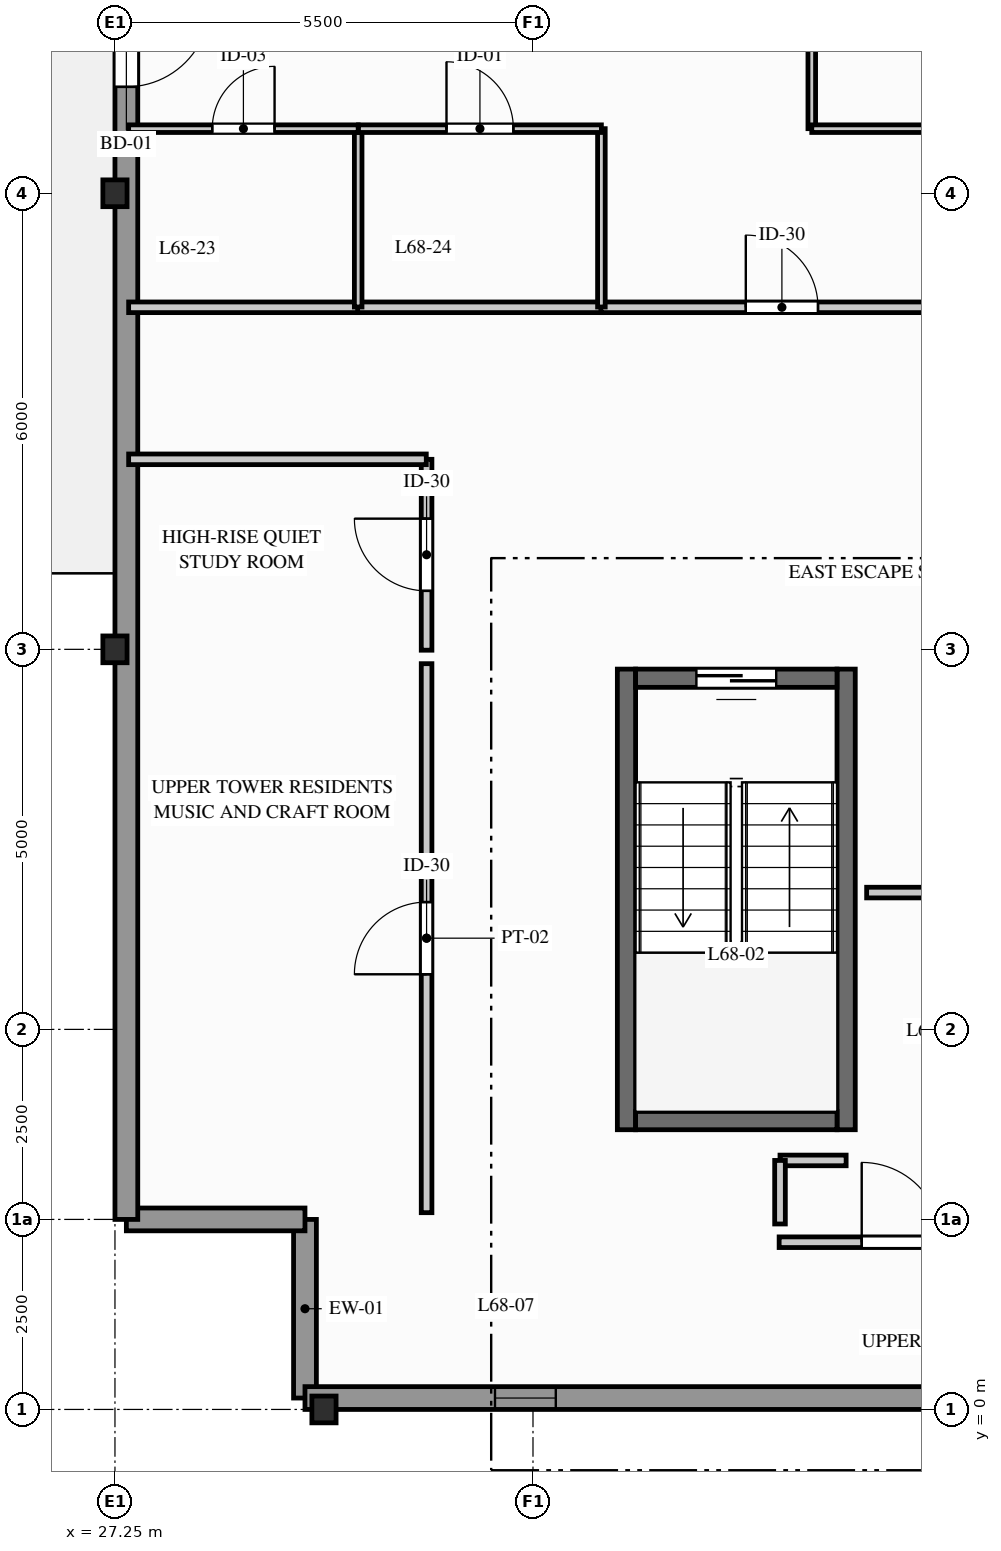
"""IFC4 building model, lengths in metres.
Left out: names, types, materials, properties, quantities, classifications, styles, units other than length and angle.
Written with IfcOpenShell. Run it as: python <this file> out.ifc"""

import sys

from ifc_helpers import new_model, si_unit, direction, frame, frame_2d, origin, origin_2d, place, context, subcontext, project, spatial, rectangle, i_section, extrude, element, fill, save


model = new_model("IFC4")
c1 = context("Model", 3, precision=1e-05, world=origin(), true_north=direction((0.0, 1.0)))
c2 = subcontext(c1, "Body", "Model", "MODEL_VIEW")
j1 = project(units=[si_unit("LENGTHUNIT", "METRE"), si_unit("PLANEANGLEUNIT", "RADIAN")], contexts=[c1])
p1 = place(None, origin())
s1 = spatial("IfcSite", under=j1, at=p1, CompositionType="ELEMENT")
p2 = place(p1, origin())
s2 = spatial("IfcBuilding", under=s1, at=p2, CompositionType="ELEMENT")
p3 = place(p2, frame((0.0, 0.0, 224.2)))
s3 = spatial("IfcBuildingStorey", under=s2, at=p3, CompositionType="ELEMENT", Elevation=224.2)
for number, where, z_axis, x_axis in (
    (1, (27.25, 10.0, 0.0), (0.0, 0.0, 1.0), (1.0, 0.0, 0.0)),
    (2, (27.25, 16.0, 0.0), (0.0, 0.0, 1.0), (1.0, 0.0, 0.0)),
    (3, (30.0, 0.0, 0.0), (0.0, 0.0, 1.0), (1.0, 0.0, 0.0)),
):
    element("IfcColumn", number, at=place(p3, frame(where, z_axis=z_axis, x_axis=x_axis)), inside=s3, PredefinedType="COLUMN", context=c2, shape_type="SweptSolid", body=[
        extrude(i_section(OverallWidth=0.318, OverallDepth=0.353, WebThickness=0.023, FlangeThickness=0.038, FilletRadius=0.015, at=origin_2d()), origin(), (0.0, 0.0, 1.0), 3.1),
    ])
for number, where, z_axis, x_axis in (
    (4, (29.75, 2.5, 0.0), (0.0, 0.0, 1.0), (0.0, -1.0, 0.0)),
    (5, (27.4, 2.5, 0.0), (0.0, 0.0, 1.0), (1.0, 0.0, 0.0)),
):
    element("IfcWall", number, at=place(p3, frame(where, z_axis=z_axis, x_axis=x_axis)), inside=s3, PredefinedType="STANDARD", context=c2, shape_type="SweptSolid", body=[
        extrude(rectangle(XDim=2.35, YDim=0.3, at=frame_2d((1.175, 0.0))), origin(), (0.0, 0.0, 1.0), 2.89),
    ])
p4 = place(p3, frame((29.75, 0.15, 0.0), z_axis=(0.0, 0.0, 1.0), x_axis=(1.0, 0.0, 0.0)))
e6 = element("IfcWall", 6, at=p4, inside=s3, PredefinedType="STANDARD", context=c2, shape_type="SweptSolid", body=[
    extrude(rectangle(XDim=27.75, YDim=0.3, at=frame_2d((13.875, 0.0))), origin(), (0.0, 0.0, 1.0), 2.332),
])
p5 = place(p4, frame((2.5, 0.0, 0.712)))
e7 = element("IfcOpeningElement", 7, at=p5, cuts=e6, PredefinedType="OPENING", context=c2, shape_type="SweptSolid", body=[
    extrude(rectangle(XDim=0.8, YDim=1.4, at=frame_2d((0.4, 0.7))), frame((0.0, 0.16, 0.0), z_axis=(0.0, -1.0, 0.0), x_axis=(1.0, 0.0, 0.0)), (0.0, 0.0, 1.0), 0.32),
])
p6 = place(p4, frame((21.25, 0.0, 0.312)))
e8 = element("IfcOpeningElement", 8, at=p6, cuts=e6, PredefinedType="OPENING", context=c2, shape_type="SweptSolid", body=[
    extrude(rectangle(XDim=1.5, YDim=1.8, at=frame_2d((0.75, 0.9))), frame((0.0, 0.16, 0.0), z_axis=(0.0, -1.0, 0.0), x_axis=(1.0, 0.0, 0.0)), (0.0, 0.0, 1.0), 0.32),
])
p7 = place(p3, frame((27.4, 24.0, 0.0), z_axis=(0.0, 0.0, 1.0), x_axis=(0.0, -1.0, 0.0)))
e9 = element("IfcWall", 9, at=p7, inside=s3, PredefinedType="STANDARD", context=c2, shape_type="SweptSolid", body=[
    extrude(rectangle(XDim=21.5, YDim=0.3, at=frame_2d((10.75, 0.0))), origin(), (0.0, 0.0, 1.0), 2.332),
])
p8 = place(p7, frame((5.5, 0.0, 0.0)))
e10 = element("IfcOpeningElement", 10, at=p8, cuts=e9, PredefinedType="OPENING", context=c2, shape_type="SweptSolid", body=[
    extrude(rectangle(XDim=1.1, YDim=2.2, at=frame_2d((0.55, 1.1))), frame((0.0, 0.16, 0.0), z_axis=(0.0, -1.0, 0.0), x_axis=(1.0, 0.0, 0.0)), (0.0, 0.0, 1.0), 0.32),
])
p9 = place(p7, frame((2.43, 0.0, 0.312)))
e11 = element("IfcOpeningElement", 11, at=p9, cuts=e9, PredefinedType="OPENING", context=c2, shape_type="SweptSolid", body=[
    extrude(rectangle(XDim=1.5, YDim=1.8, at=frame_2d((0.75, 0.9))), frame((0.0, 0.16, 0.0), z_axis=(0.0, -1.0, 0.0), x_axis=(1.0, 0.0, 0.0)), (0.0, 0.0, 1.0), 0.32),
])
for number, where, z_axis, x_axis in (
    (12, (33.98, 3.68, 0.0), (0.0, 0.0, 1.0), (0.0, 1.0, 0.0)),
    (13, (36.87, 3.68, 0.0), (0.0, 0.0, 1.0), (0.0, 1.0, 0.0)),
):
    element("IfcWall", number, at=place(p3, frame(where, z_axis=z_axis, x_axis=x_axis)), inside=s3, PredefinedType="SHEAR", context=c2, shape_type="SweptSolid", body=[
        extrude(rectangle(XDim=6.06, YDim=0.24, at=frame_2d((3.03, 0.0))), origin(), (0.0, 0.0, 1.0), 2.89),
    ])
p10 = place(p3, frame((34.1, 3.8, 0.0), z_axis=(0.0, 0.0, 1.0), x_axis=(1.0, 0.0, 0.0)))
e14 = element("IfcWall", 14, at=p10, inside=s3, PredefinedType="SHEAR", context=c2, shape_type="SweptSolid", body=[
    extrude(rectangle(XDim=2.65, YDim=0.24, at=frame_2d((1.325, 0.0))), origin(), (0.0, 0.0, 1.0), 2.89),
])
p11 = place(p3, frame((36.75, 9.62, 0.0), z_axis=(0.0, 0.0, 1.0), x_axis=(-1.0, 0.0, 0.0)))
e15 = element("IfcWall", 15, at=p11, inside=s3, PredefinedType="SHEAR", context=c2, shape_type="SweptSolid", body=[
    extrude(rectangle(XDim=2.65, YDim=0.24, at=frame_2d((1.325, 0.0))), origin(), (0.0, 0.0, 1.0), 2.89),
])
p12 = place(p11, frame((0.8, 0.0, 0.0)))
e16 = element("IfcOpeningElement", 16, at=p12, cuts=e15, PredefinedType="OPENING", context=c2, shape_type="SweptSolid", body=[
    extrude(rectangle(XDim=1.05, YDim=2.06, at=frame_2d((0.525, 1.03))), frame((0.0, 0.13, 0.0), z_axis=(0.0, -1.0, 0.0), x_axis=(1.0, 0.0, 0.0)), (0.0, 0.0, 1.0), 0.26),
])
p13 = place(p3, frame((31.35, 2.589, 0.0), z_axis=(0.0, 0.0, 1.0), x_axis=(0.0, 1.0, 0.0)))
e17 = element("IfcWall", 17, at=p13, inside=s3, PredefinedType="PARTITIONING", context=c2, shape_type="SweptSolid", body=[
    extrude(rectangle(XDim=7.223, YDim=0.14, at=frame_2d((3.611, 0.0))), origin(), (0.0, 0.0, 1.0), 2.89),
])
p14 = place(p13, frame((3.136, 0.0, 0.0)))
e18 = element("IfcOpeningElement", 18, at=p14, cuts=e17, PredefinedType="OPENING", context=c2, shape_type="SweptSolid", body=[
    extrude(rectangle(XDim=0.95, YDim=2.05, at=frame_2d((0.475, 1.025))), frame((0.0, 0.08, 0.0), z_axis=(0.0, -1.0, 0.0), x_axis=(1.0, 0.0, 0.0)), (0.0, 0.0, 1.0), 0.16),
])
p15 = place(p3, frame((31.35, 9.989, 0.0), z_axis=(0.0, 0.0, 1.0), x_axis=(0.0, 1.0, 0.0)))
e19 = element("IfcWall", 19, at=p15, inside=s3, PredefinedType="PARTITIONING", context=c2, shape_type="SweptSolid", body=[
    extrude(rectangle(XDim=2.511, YDim=0.14, at=frame_2d((1.256, 0.0))), origin(), (0.0, 0.0, 1.0), 2.325),
])
p16 = place(p15, frame((0.781, 0.0, 0.0)))
e20 = element("IfcOpeningElement", 20, at=p16, cuts=e19, PredefinedType="OPENING", context=c2, shape_type="SweptSolid", body=[
    extrude(rectangle(XDim=0.95, YDim=2.05, at=frame_2d((0.475, 1.025))), frame((0.0, 0.08, 0.0), z_axis=(0.0, -1.0, 0.0), x_axis=(1.0, 0.0, 0.0)), (0.0, 0.0, 1.0), 0.16),
])
p17 = place(p3, frame((35.989, 2.2, 0.0), z_axis=(0.0, 0.0, 1.0), x_axis=(1.0, 0.0, 0.0)))
e21 = element("IfcWall", 21, at=p17, inside=s3, PredefinedType="PARTITIONING", context=c2, shape_type="SweptSolid", body=[
    extrude(rectangle(XDim=3.222, YDim=0.14, at=frame_2d((1.611, 0.0))), origin(), (0.0, 0.0, 1.0), 2.325),
])
p18 = place(p17, frame((1.086, 0.0, 0.0)))
e22 = element("IfcOpeningElement", 22, at=p18, cuts=e21, PredefinedType="OPENING", context=c2, shape_type="SweptSolid", body=[
    extrude(rectangle(XDim=1.05, YDim=2.06, at=frame_2d((0.525, 1.03))), frame((0.0, 0.08, 0.0), z_axis=(0.0, -1.0, 0.0), x_axis=(1.0, 0.0, 0.0)), (0.0, 0.0, 1.0), 0.16),
])
p19 = place(p3, frame((27.43, 12.5, 0.0), z_axis=(0.0, 0.0, 1.0), x_axis=(1.0, 0.0, 0.0)))
e23 = element("IfcWall", 23, at=p19, inside=s3, PredefinedType="PARTITIONING", context=c2, shape_type="SweptSolid", body=[
    extrude(rectangle(XDim=3.916, YDim=0.14, at=frame_2d((1.958, 0.0))), origin(), (0.0, 0.0, 1.0), 2.89),
])
p20 = place(p3, frame((27.43, 14.5, 0.0), z_axis=(0.0, 0.0, 1.0), x_axis=(1.0, 0.0, 0.0)))
e24 = element("IfcWall", 24, at=p20, inside=s3, PredefinedType="PARTITIONING", context=c2, shape_type="SweptSolid", body=[
    extrude(rectangle(XDim=3.031, YDim=0.14, at=frame_2d((1.516, 0.0))), origin(), (0.0, 0.0, 1.0), 2.89),
])
p21 = place(p3, frame((30.443, 14.5, 0.0), z_axis=(0.0, 0.0, 1.0), x_axis=(1.0, 0.0, 0.0)))
e25 = element("IfcWall", 25, at=p21, inside=s3, PredefinedType="PARTITIONING", context=c2, shape_type="SweptSolid", body=[
    extrude(rectangle(XDim=3.219, YDim=0.14, at=frame_2d((1.609, 0.0))), origin(), (0.0, 0.0, 1.0), 2.89),
])
p22 = place(p3, frame((33.643, 14.5, 0.0), z_axis=(0.0, 0.0, 1.0), x_axis=(1.0, 0.0, 0.0)))
e26 = element("IfcWall", 26, at=p22, inside=s3, PredefinedType="PARTITIONING", context=c2, shape_type="SweptSolid", body=[
    extrude(rectangle(XDim=4.765, YDim=0.14, at=frame_2d((2.382, 0.0))), origin(), (0.0, 0.0, 1.0), 2.325),
])
p23 = place(p22, frame((1.907, 0.0, 0.0)))
e27 = element("IfcOpeningElement", 27, at=p23, cuts=e26, PredefinedType="OPENING", context=c2, shape_type="SweptSolid", body=[
    extrude(rectangle(XDim=0.95, YDim=2.05, at=frame_2d((0.475, 1.025))), frame((0.0, 0.08, 0.0), z_axis=(0.0, -1.0, 0.0), x_axis=(1.0, 0.0, 0.0)), (0.0, 0.0, 1.0), 0.16),
])
p24 = place(p3, frame((30.45, 14.504, 0.0), z_axis=(0.0, 0.0, 1.0), x_axis=(0.0, 1.0, 0.0)))
e28 = element("IfcWall", 28, at=p24, inside=s3, PredefinedType="PARTITIONING", context=c2, shape_type="SweptSolid", body=[
    extrude(rectangle(XDim=2.346, YDim=0.1, at=frame_2d((1.173, 0.0))), origin(), (0.0, 0.0, 1.0), 2.325),
])
p25 = place(p3, frame((27.43, 16.85, 0.0), z_axis=(0.0, 0.0, 1.0), x_axis=(1.0, 0.0, 0.0)))
e29 = element("IfcWall", 29, at=p25, inside=s3, PredefinedType="PARTITIONING", context=c2, shape_type="SweptSolid", body=[
    extrude(rectangle(XDim=3.02, YDim=0.1, at=frame_2d((1.51, 0.0))), origin(), (0.0, 0.0, 1.0), 2.89),
])
p26 = place(p25, frame((1.1, 0.0, 0.0)))
e30 = element("IfcOpeningElement", 30, at=p26, cuts=e29, PredefinedType="OPENING", context=c2, shape_type="SweptSolid", body=[
    extrude(rectangle(XDim=0.82, YDim=2.02, at=frame_2d((0.41, 1.01))), frame((0.0, 0.06, 0.0), z_axis=(0.0, -1.0, 0.0), x_axis=(1.0, 0.0, 0.0)), (0.0, 0.0, 1.0), 0.12),
])
p27 = place(p3, frame((33.65, 14.504, 0.0), z_axis=(0.0, 0.0, 1.0), x_axis=(0.0, 1.0, 0.0)))
e31 = element("IfcWall", 31, at=p27, inside=s3, PredefinedType="PARTITIONING", context=c2, shape_type="SweptSolid", body=[
    extrude(rectangle(XDim=2.346, YDim=0.1, at=frame_2d((1.173, 0.0))), origin(), (0.0, 0.0, 1.0), 2.325),
])
p28 = place(p3, frame((30.454, 16.85, 0.0), z_axis=(0.0, 0.0, 1.0), x_axis=(1.0, 0.0, 0.0)))
e32 = element("IfcWall", 32, at=p28, inside=s3, PredefinedType="PARTITIONING", context=c2, shape_type="SweptSolid", body=[
    extrude(rectangle(XDim=3.196, YDim=0.1, at=frame_2d((1.598, 0.0))), origin(), (0.0, 0.0, 1.0), 2.89),
])
p29 = place(p28, frame((1.158, 0.0, 0.0)))
e33 = element("IfcOpeningElement", 33, at=p29, cuts=e32, PredefinedType="OPENING", context=c2, shape_type="SweptSolid", body=[
    extrude(rectangle(XDim=0.88, YDim=2.04, at=frame_2d((0.44, 1.02))), frame((0.0, 0.06, 0.0), z_axis=(0.0, -1.0, 0.0), x_axis=(1.0, 0.0, 0.0)), (0.0, 0.0, 1.0), 0.12),
])
p30 = place(p3, frame((36.418, 16.85, 0.0), z_axis=(0.0, 0.0, 1.0), x_axis=(0.0, 1.0, 0.0)))
e34 = element("IfcWall", 34, at=p30, inside=s3, PredefinedType="PARTITIONING", context=c2, shape_type="SweptSolid", body=[
    extrude(rectangle(XDim=4.896, YDim=0.1, at=frame_2d((2.448, 0.0))), origin(), (0.0, 0.0, 1.0), 2.614),
])
p31 = place(p30, frame((2.008, 0.0, 0.0)))
e35 = element("IfcOpeningElement", 35, at=p31, cuts=e34, PredefinedType="OPENING", context=c2, shape_type="SweptSolid", body=[
    extrude(rectangle(XDim=0.88, YDim=2.04, at=frame_2d((0.44, 1.02))), frame((0.0, 0.06, 0.0), z_axis=(0.0, -1.0, 0.0), x_axis=(1.0, 0.0, 0.0)), (0.0, 0.0, 1.0), 0.12),
])
p32 = place(p3, frame((36.418, 16.85, 0.0), z_axis=(0.0, 0.0, 1.0), x_axis=(1.0, 0.0, 0.0)))
e36 = element("IfcWall", 36, at=p32, inside=s3, PredefinedType="PARTITIONING", context=c2, shape_type="SweptSolid", body=[
    extrude(rectangle(XDim=1.978, YDim=0.1, at=frame_2d((0.989, 0.0))), origin(), (0.0, 0.0, 1.0), 2.325),
])
p33 = place(p3, frame((37.14, 6.8, 0.0), z_axis=(0.0, 0.0, 1.0), x_axis=(1.0, 0.0, 0.0)))
e37 = element("IfcWall", 37, at=p33, inside=s3, PredefinedType="PARTITIONING", context=c2, shape_type="SweptSolid", body=[
    extrude(rectangle(XDim=2.06, YDim=0.14, at=frame_2d((1.03, 0.0))), origin(), (0.0, 0.0, 1.0), 2.325),
])
p34 = place(p3, frame((36.0, 3.276, 0.0), z_axis=(0.0, 0.0, 1.0), x_axis=(1.0, 0.0, 0.0)))
e38 = element("IfcWall", 38, at=p34, inside=s3, PredefinedType="PARTITIONING", context=c2, shape_type="SweptSolid", body=[
    extrude(rectangle(XDim=0.87, YDim=0.14, at=frame_2d((0.435, 0.0))), origin(), (0.0, 0.0, 1.0), 2.89),
])
p35 = place(p3, frame((36.0, 2.44, 0.0), z_axis=(0.0, 0.0, 1.0), x_axis=(0.0, 1.0, 0.0)))
e39 = element("IfcWall", 39, at=p35, inside=s3, PredefinedType="PARTITIONING", context=c2, shape_type="SweptSolid", body=[
    extrude(rectangle(XDim=0.836, YDim=0.14, at=frame_2d((0.418, 0.0))), origin(), (0.0, 0.0, 1.0), 2.89),
])
p36 = place(p5, origin())
e40 = element("IfcWindow", 40, at=p36, inside=s3, PartitioningType="SINGLE_PANEL", PredefinedType="WINDOW", context=c2, shape_type="SweptSolid", body=[
    extrude(rectangle(XDim=0.8, YDim=1.4, at=frame_2d((0.4, 0.7))), frame((0.0, 0.03, 0.0), z_axis=(0.0, -1.0, 0.0), x_axis=(1.0, 0.0, 0.0)), (0.0, 0.0, 1.0), 0.06),
])
fill(e7, e40)
p37 = place(p8, origin())
e41 = element("IfcDoor", 41, at=p37, inside=s3, OperationType="SINGLE_SWING_LEFT", PredefinedType="DOOR", context=c2, shape_type="SweptSolid", body=[
    extrude(rectangle(XDim=1.1, YDim=2.2, at=frame_2d((0.55, 1.1))), frame((0.0, 0.025, 0.0), z_axis=(0.0, -1.0, 0.0), x_axis=(1.0, 0.0, 0.0)), (0.0, 0.0, 1.0), 0.05),
])
fill(e10, e41)
p38 = place(p12, origin())
e42 = element("IfcDoor", 42, at=p38, inside=s3, OperationType="SINGLE_SWING_LEFT", PredefinedType="DOOR", context=c2, shape_type="SweptSolid", body=[
    extrude(rectangle(XDim=1.05, YDim=2.06, at=frame_2d((0.525, 1.03))), frame((0.0, 0.025, 0.0), z_axis=(0.0, -1.0, 0.0), x_axis=(1.0, 0.0, 0.0)), (0.0, 0.0, 1.0), 0.05),
])
fill(e16, e42)
p39 = place(p14, origin())
e43 = element("IfcDoor", 43, at=p39, inside=s3, OperationType="SINGLE_SWING_LEFT", PredefinedType="DOOR", context=c2, shape_type="SweptSolid", body=[
    extrude(rectangle(XDim=0.95, YDim=2.05, at=frame_2d((0.475, 1.025))), frame((0.0, 0.025, 0.0), z_axis=(0.0, -1.0, 0.0), x_axis=(1.0, 0.0, 0.0)), (0.0, 0.0, 1.0), 0.05),
])
fill(e18, e43)
p40 = place(p16, origin())
e44 = element("IfcDoor", 44, at=p40, inside=s3, OperationType="SINGLE_SWING_RIGHT", PredefinedType="DOOR", context=c2, shape_type="SweptSolid", body=[
    extrude(rectangle(XDim=0.95, YDim=2.05, at=frame_2d((0.475, 1.025))), frame((0.0, 0.025, 0.0), z_axis=(0.0, -1.0, 0.0), x_axis=(1.0, 0.0, 0.0)), (0.0, 0.0, 1.0), 0.05),
])
fill(e20, e44)
p41 = place(p18, origin())
e45 = element("IfcDoor", 45, at=p41, inside=s3, OperationType="SINGLE_SWING_LEFT", PredefinedType="DOOR", context=c2, shape_type="SweptSolid", body=[
    extrude(rectangle(XDim=1.05, YDim=2.06, at=frame_2d((0.525, 1.03))), frame((0.0, 0.025, 0.0), z_axis=(0.0, -1.0, 0.0), x_axis=(1.0, 0.0, 0.0)), (0.0, 0.0, 1.0), 0.05),
])
fill(e22, e45)
p42 = place(p23, origin())
e46 = element("IfcDoor", 46, at=p42, inside=s3, OperationType="SINGLE_SWING_LEFT", PredefinedType="DOOR", context=c2, shape_type="SweptSolid", body=[
    extrude(rectangle(XDim=0.95, YDim=2.05, at=frame_2d((0.475, 1.025))), frame((0.0, 0.025, 0.0), z_axis=(0.0, -1.0, 0.0), x_axis=(1.0, 0.0, 0.0)), (0.0, 0.0, 1.0), 0.05),
])
fill(e27, e46)
p43 = place(p26, origin())
e47 = element("IfcDoor", 47, at=p43, inside=s3, OperationType="SINGLE_SWING_RIGHT", PredefinedType="DOOR", context=c2, shape_type="SweptSolid", body=[
    extrude(rectangle(XDim=0.82, YDim=2.02, at=frame_2d((0.41, 1.01))), frame((0.0, 0.025, 0.0), z_axis=(0.0, -1.0, 0.0), x_axis=(1.0, 0.0, 0.0)), (0.0, 0.0, 1.0), 0.05),
])
fill(e30, e47)
p44 = place(p29, origin())
e48 = element("IfcDoor", 48, at=p44, inside=s3, OperationType="SINGLE_SWING_LEFT", PredefinedType="DOOR", context=c2, shape_type="SweptSolid", body=[
    extrude(rectangle(XDim=0.88, YDim=2.04, at=frame_2d((0.44, 1.02))), frame((0.0, 0.025, 0.0), z_axis=(0.0, -1.0, 0.0), x_axis=(1.0, 0.0, 0.0)), (0.0, 0.0, 1.0), 0.05),
])
fill(e33, e48)
save(model, sys.argv[1])
